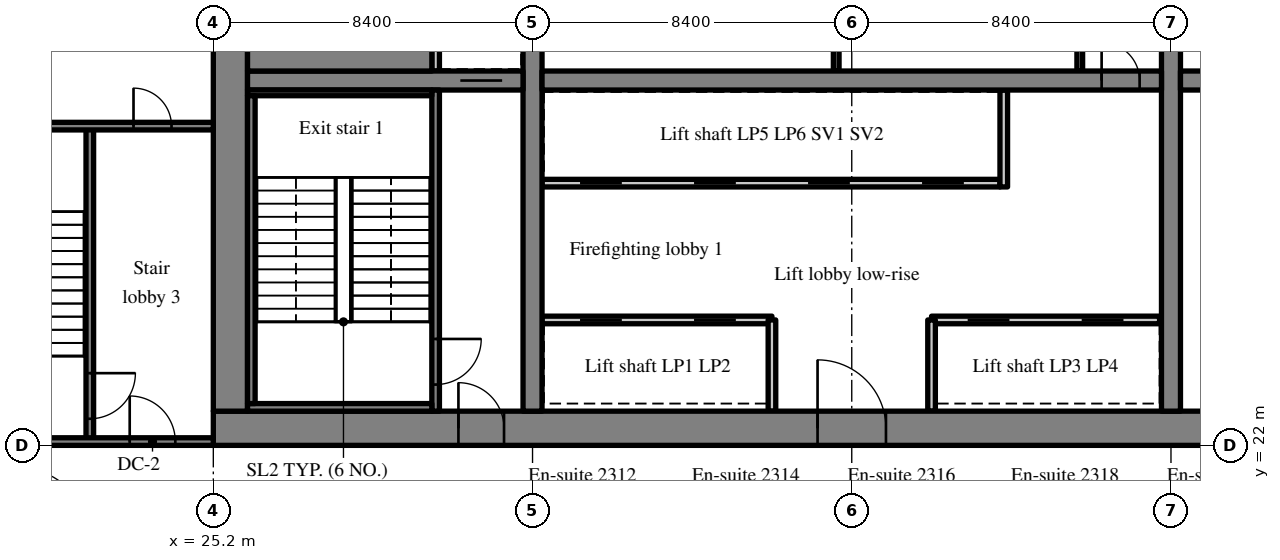
"""IFC4 building model, lengths in metres.
Left out: names, types, materials, properties, quantities, classifications, styles, units other than length and angle.
Written with IfcOpenShell. Run it as: python <this file> out.ifc"""

import sys

from ifc_helpers import new_model, si_unit, direction, frame, frame_2d, origin, place, context, subcontext, project, spatial, rectangle, extrude, source, transform, mapped, element, fill, save


model = new_model("IFC4")
c1 = context("Model", 3, precision=1e-05, world=origin(), true_north=direction((0.0, 1.0)))
c2 = subcontext(c1, "Body", "Model", "MODEL_VIEW")
j1 = project(units=[si_unit("LENGTHUNIT", "METRE"), si_unit("PLANEANGLEUNIT", "RADIAN")], contexts=[c1])
p1 = place(None, origin())
s1 = spatial("IfcSite", under=j1, at=p1, CompositionType="ELEMENT")
p2 = place(p1, origin())
s2 = spatial("IfcBuilding", under=s1, at=p2, CompositionType="ELEMENT")
p3 = place(p2, frame((0.0, 0.0, 99.0)))
s3 = spatial("IfcBuildingStorey", under=s2, at=p3, CompositionType="ELEMENT", Elevation=99.0)
m1 = source(origin(), c2, "Body", "SweptSolid", [
    extrude(rectangle(XDim=50.4, YDim=0.9, at=frame_2d((25.2, 0.0))), origin(), (0.0, 0.0, 1.0), 3.52),
])
p4 = place(p3, frame((25.2, 22.45, 0.0), z_axis=(0.0, 0.0, 1.0), x_axis=(1.0, 0.0, 0.0)))
e1 = element("IfcWall", 1, at=p4, inside=s3, PredefinedType="SHEAR", context=c2, shape_type="MappedRepresentation", body=[
    mapped(m1, transform((0.0, 0.0, 0.0), scale=1.0)),
])
m2 = source(origin(), c2, "Body", "SweptSolid", [
    extrude(rectangle(XDim=1.8, YDim=2.1, at=frame_2d((0.9, 1.05))), frame((0.0, 0.46, 0.0), z_axis=(0.0, -1.0, 0.0), x_axis=(1.0, 0.0, 0.0)), (0.0, 0.0, 1.0), 0.92),
])
p5 = place(p4, frame((15.9, 0.0, 0.0)))
e2 = element("IfcOpeningElement", 2, at=p5, cuts=e1, PredefinedType="OPENING", context=c2, shape_type="MappedRepresentation", body=[
    mapped(m2, transform((0.0, 0.0, 0.0), scale=1.0)),
])
m3 = source(origin(), c2, "Body", "SweptSolid", [
    extrude(rectangle(XDim=1.2, YDim=2.1, at=frame_2d((0.6, 1.05))), frame((0.0, 0.46, 0.0), z_axis=(0.0, -1.0, 0.0), x_axis=(1.0, 0.0, 0.0)), (0.0, 0.0, 1.0), 0.92),
])
p6 = place(p4, frame((26.975, 0.0, 0.0)))
e3 = element("IfcOpeningElement", 3, at=p6, cuts=e1, PredefinedType="OPENING", context=c2, shape_type="MappedRepresentation", body=[
    mapped(m3, transform((0.0, 0.0, 0.0), scale=1.0)),
])
m4 = source(origin(), c2, "Body", "SweptSolid", [
    extrude(rectangle(XDim=0.9, YDim=2.1, at=frame_2d((0.45, 1.05))), frame((0.0, 0.46, 0.0), z_axis=(0.0, -1.0, 0.0), x_axis=(1.0, 0.0, 0.0)), (0.0, 0.0, 1.0), 0.92),
])
p7 = place(p4, frame((32.25, 0.0, 0.0)))
e4 = element("IfcOpeningElement", 4, at=p7, cuts=e1, PredefinedType="OPENING", context=c2, shape_type="MappedRepresentation", body=[
    mapped(m4, transform((0.0, 0.0, 0.0), scale=1.0)),
])
p8 = place(p4, frame((38.275, 0.0, 0.0)))
e5 = element("IfcOpeningElement", 5, at=p8, cuts=e1, PredefinedType="OPENING", context=c2, shape_type="MappedRepresentation", body=[
    mapped(m4, transform((0.0, 0.0, 0.0), scale=1.0)),
])
p9 = place(p4, frame((6.45, 0.0, 0.0)))
e6 = element("IfcOpeningElement", 6, at=p9, cuts=e1, PredefinedType="OPENING", context=c2, shape_type="MappedRepresentation", body=[
    mapped(m3, transform((0.0, 0.0, 0.0), scale=1.0)),
])
p10 = place(p4, frame((47.775, 0.0, 0.0)))
e7 = element("IfcOpeningElement", 7, at=p10, cuts=e1, PredefinedType="OPENING", context=c2, shape_type="MappedRepresentation", body=[
    mapped(m3, transform((0.0, 0.0, 0.0), scale=1.0)),
])
m5 = source(origin(), c2, "Body", "SweptSolid", [
    extrude(rectangle(XDim=18.2, YDim=0.9, at=frame_2d((9.1, 0.0))), origin(), (0.0, 0.0, 1.0), 3.52),
])
p11 = place(p3, frame((25.65, 22.9, 0.0), z_axis=(0.0, 0.0, 1.0), x_axis=(0.0, 1.0, 0.0)))
e8 = element("IfcWall", 8, at=p11, inside=s3, PredefinedType="SHEAR", context=c2, shape_type="MappedRepresentation", body=[
    mapped(m5, transform((0.0, 0.0, 0.0), scale=1.0)),
])
m6 = source(origin(), c2, "Body", "SweptSolid", [
    extrude(rectangle(XDim=18.2, YDim=0.5, at=frame_2d((9.1, 0.0))), origin(), (0.0, 0.0, 1.0), 3.52),
])
p12 = place(p3, frame((33.6, 22.9, 0.0), z_axis=(0.0, 0.0, 1.0), x_axis=(0.0, 1.0, 0.0)))
e9 = element("IfcWall", 9, at=p12, inside=s3, PredefinedType="SHEAR", context=c2, shape_type="MappedRepresentation", body=[
    mapped(m6, transform((0.0, 0.0, 0.0), scale=1.0)),
])
m7 = source(origin(), c2, "Body", "SweptSolid", [
    extrude(rectangle(XDim=1.1, YDim=2.1, at=frame_2d((0.55, 1.05))), frame((0.0, 0.26, 0.0), z_axis=(0.0, -1.0, 0.0), x_axis=(1.0, 0.0, 0.0)), (0.0, 0.0, 1.0), 0.52),
])
p13 = place(p12, frame((12.55, 0.0, 0.0)))
e10 = element("IfcOpeningElement", 10, at=p13, cuts=e9, PredefinedType="OPENING", context=c2, shape_type="MappedRepresentation", body=[
    mapped(m7, transform((0.0, 0.0, 0.0), scale=1.0)),
])
p14 = place(p3, frame((50.4, 22.9, 0.0), z_axis=(0.0, 0.0, 1.0), x_axis=(0.0, 1.0, 0.0)))
e11 = element("IfcWall", 11, at=p14, inside=s3, PredefinedType="SHEAR", context=c2, shape_type="MappedRepresentation", body=[
    mapped(m6, transform((0.0, 0.0, 0.0), scale=1.0)),
])
p15 = place(p14, frame((12.55, 0.0, 0.0)))
e12 = element("IfcOpeningElement", 12, at=p15, cuts=e11, PredefinedType="OPENING", context=c2, shape_type="MappedRepresentation", body=[
    mapped(m7, transform((0.0, 0.0, 0.0), scale=1.0)),
])
m8 = source(origin(), c2, "Body", "SweptSolid", [
    extrude(rectangle(XDim=7.25, YDim=0.5, at=frame_2d((3.625, 0.0))), origin(), (0.0, 0.0, 1.0), 3.52),
])
p16 = place(p3, frame((26.1, 31.6, 0.0), z_axis=(0.0, 0.0, 1.0), x_axis=(1.0, 0.0, 0.0)))
e13 = element("IfcWall", 13, at=p16, inside=s3, PredefinedType="SHEAR", context=c2, shape_type="MappedRepresentation", body=[
    mapped(m8, transform((0.0, 0.0, 0.0), scale=1.0)),
])
p17 = place(p16, frame((5.6, 0.0, 0.0)))
e14 = element("IfcOpeningElement", 14, at=p17, cuts=e13, PredefinedType="OPENING", context=c2, shape_type="MappedRepresentation", body=[
    mapped(m7, transform((0.0, 0.0, 0.0), scale=1.0)),
])
m9 = source(origin(), c2, "Body", "SweptSolid", [
    extrude(rectangle(XDim=16.3, YDim=0.5, at=frame_2d((8.15, 0.0))), origin(), (0.0, 0.0, 1.0), 3.52),
])
p18 = place(p3, frame((33.85, 31.6, 0.0), z_axis=(0.0, 0.0, 1.0), x_axis=(1.0, 0.0, 0.0)))
e15 = element("IfcWall", 15, at=p18, inside=s3, PredefinedType="SHEAR", context=c2, shape_type="MappedRepresentation", body=[
    mapped(m9, transform((0.0, 0.0, 0.0), scale=1.0)),
])
m10 = source(origin(), c2, "Body", "SweptSolid", [
    extrude(rectangle(XDim=1.0, YDim=2.1, at=frame_2d((0.5, 1.05))), frame((0.0, 0.26, 0.0), z_axis=(0.0, -1.0, 0.0), x_axis=(1.0, 0.0, 0.0)), (0.0, 0.0, 1.0), 0.52),
])
p19 = place(p18, frame((14.725, 0.0, 0.0)))
e16 = element("IfcOpeningElement", 16, at=p19, cuts=e15, PredefinedType="OPENING", context=c2, shape_type="MappedRepresentation", body=[
    mapped(m10, transform((0.0, 0.0, 0.0), scale=1.0)),
])
m11 = source(origin(), c2, "Body", "SweptSolid", [
    extrude(rectangle(XDim=16.3, YDim=0.5, at=frame_2d((8.15, 0.0))), origin(), (0.0, 0.0, 1.0), 3.52),
])
p20 = place(p3, frame((50.65, 31.6, 0.0), z_axis=(0.0, 0.0, 1.0), x_axis=(1.0, 0.0, 0.0)))
e17 = element("IfcWall", 17, at=p20, inside=s3, PredefinedType="SHEAR", context=c2, shape_type="MappedRepresentation", body=[
    mapped(m11, transform((0.0, 0.0, 0.0), scale=1.0)),
])
p21 = place(p20, frame((0.575, 0.0, 0.0)))
e18 = element("IfcOpeningElement", 18, at=p21, cuts=e17, PredefinedType="OPENING", context=c2, shape_type="MappedRepresentation", body=[
    mapped(m10, transform((0.0, 0.0, 0.0), scale=1.0)),
])
m12 = source(origin(), c2, "Body", "SweptSolid", [
    extrude(rectangle(XDim=6.05, YDim=0.2, at=frame_2d((3.025, 0.0))), origin(), (0.0, 0.0, 1.0), 3.52),
])
p22 = place(p3, frame((33.85, 25.3, 0.0), z_axis=(0.0, 0.0, 1.0), x_axis=(1.0, 0.0, 0.0)))
e19 = element("IfcWall", 19, at=p22, inside=s3, PredefinedType="SOLIDWALL", context=c2, shape_type="MappedRepresentation", body=[
    mapped(m12, transform((0.0, 0.0, 0.0), scale=1.0)),
])
m13 = source(origin(), c2, "Body", "SweptSolid", [
    extrude(rectangle(XDim=1.1, YDim=2.1, at=frame_2d((0.55, 1.05))), frame((0.0, 0.11, 0.0), z_axis=(0.0, -1.0, 0.0), x_axis=(1.0, 0.0, 0.0)), (0.0, 0.0, 1.0), 0.22),
])
p23 = place(p22, frame((1.0, 0.0, 0.0)))
e20 = element("IfcOpeningElement", 20, at=p23, cuts=e19, PredefinedType="OPENING", context=c2, shape_type="MappedRepresentation", body=[
    mapped(m13, transform((0.0, 0.0, 0.0), scale=1.0)),
])
p24 = place(p22, frame((4.0, 0.0, 0.0)))
e21 = element("IfcOpeningElement", 21, at=p24, cuts=e19, PredefinedType="OPENING", context=c2, shape_type="MappedRepresentation", body=[
    mapped(m13, transform((0.0, 0.0, 0.0), scale=1.0)),
])
m14 = source(origin(), c2, "Body", "SweptSolid", [
    extrude(rectangle(XDim=6.0, YDim=0.2, at=frame_2d((3.0, 0.0))), origin(), (0.0, 0.0, 1.0), 3.52),
])
p25 = place(p3, frame((44.1, 25.3, 0.0), z_axis=(0.0, 0.0, 1.0), x_axis=(1.0, 0.0, 0.0)))
e22 = element("IfcWall", 22, at=p25, inside=s3, PredefinedType="SOLIDWALL", context=c2, shape_type="MappedRepresentation", body=[
    mapped(m14, transform((0.0, 0.0, 0.0), scale=1.0)),
])
p26 = place(p25, frame((0.95, 0.0, 0.0)))
e23 = element("IfcOpeningElement", 23, at=p26, cuts=e22, PredefinedType="OPENING", context=c2, shape_type="MappedRepresentation", body=[
    mapped(m13, transform((0.0, 0.0, 0.0), scale=1.0)),
])
p27 = place(p25, frame((3.95, 0.0, 0.0)))
e24 = element("IfcOpeningElement", 24, at=p27, cuts=e22, PredefinedType="OPENING", context=c2, shape_type="MappedRepresentation", body=[
    mapped(m13, transform((0.0, 0.0, 0.0), scale=1.0)),
])
m15 = source(origin(), c2, "Body", "SweptSolid", [
    extrude(rectangle(XDim=12.05, YDim=0.2, at=frame_2d((6.025, 0.0))), origin(), (0.0, 0.0, 1.0), 3.52),
])
p28 = place(p3, frame((33.85, 28.9, 0.0), z_axis=(0.0, 0.0, 1.0), x_axis=(1.0, 0.0, 0.0)))
e25 = element("IfcWall", 25, at=p28, inside=s3, PredefinedType="SOLIDWALL", context=c2, shape_type="MappedRepresentation", body=[
    mapped(m15, transform((0.0, 0.0, 0.0), scale=1.0)),
])
p29 = place(p28, frame((1.0, 0.0, 0.0)))
e26 = element("IfcOpeningElement", 26, at=p29, cuts=e25, PredefinedType="OPENING", context=c2, shape_type="MappedRepresentation", body=[
    mapped(m13, transform((0.0, 0.0, 0.0), scale=1.0)),
])
p30 = place(p28, frame((4.0, 0.0, 0.0)))
e27 = element("IfcOpeningElement", 27, at=p30, cuts=e25, PredefinedType="OPENING", context=c2, shape_type="MappedRepresentation", body=[
    mapped(m13, transform((0.0, 0.0, 0.0), scale=1.0)),
])
p31 = place(p28, frame((7.0, 0.0, 0.0)))
e28 = element("IfcOpeningElement", 28, at=p31, cuts=e25, PredefinedType="OPENING", context=c2, shape_type="MappedRepresentation", body=[
    mapped(m13, transform((0.0, 0.0, 0.0), scale=1.0)),
])
p32 = place(p28, frame((10.0, 0.0, 0.0)))
e29 = element("IfcOpeningElement", 29, at=p32, cuts=e25, PredefinedType="OPENING", context=c2, shape_type="MappedRepresentation", body=[
    mapped(m13, transform((0.0, 0.0, 0.0), scale=1.0)),
])
m16 = source(origin(), c2, "Body", "SweptSolid", [
    extrude(rectangle(XDim=2.4, YDim=0.2, at=frame_2d((1.2, 0.0))), origin(), (0.0, 0.0, 1.0), 3.52),
])
for number, where, z_axis, x_axis in (
    (30, (39.9, 22.9, 0.0), (0.0, 0.0, 1.0), (0.0, 1.0, 0.0)),
    (31, (44.1, 22.9, 0.0), (0.0, 0.0, 1.0), (0.0, 1.0, 0.0)),
):
    element("IfcWall", number, at=place(p3, frame(where, z_axis=z_axis, x_axis=x_axis)), inside=s3, PredefinedType="SOLIDWALL", context=c2, shape_type="MappedRepresentation", body=[
        mapped(m16, transform((0.0, 0.0, 0.0), scale=1.0)),
    ])
m17 = source(origin(), c2, "Body", "SweptSolid", [
    extrude(rectangle(XDim=2.55, YDim=0.2, at=frame_2d((1.275, 0.0))), origin(), (0.0, 0.0, 1.0), 3.52),
])
p33 = place(p3, frame((46.0, 28.8, 0.0), z_axis=(0.0, 0.0, 1.0), x_axis=(0.0, 1.0, 0.0)))
e32 = element("IfcWall", 32, at=p33, inside=s3, PredefinedType="SOLIDWALL", context=c2, shape_type="MappedRepresentation", body=[
    mapped(m17, transform((0.0, 0.0, 0.0), scale=1.0)),
])
m18 = source(origin(), c2, "Body", "SweptSolid", [
    extrude(rectangle(XDim=3.15, YDim=0.15, at=frame_2d((1.575, 0.0))), origin(), (0.0, 0.0, 1.0), 3.52),
])
for number, where, z_axis, x_axis in (
    (33, (48.0, 31.85, 0.0), (0.0, 0.0, 1.0), (0.0, 1.0, 0.0)),
    (34, (41.591, 31.85, 0.0), (0.0, 0.0, 1.0), (0.0, 1.0, 0.0)),
):
    element("IfcWall", number, at=place(p3, frame(where, z_axis=z_axis, x_axis=x_axis)), inside=s3, PredefinedType="PARTITIONING", context=c2, shape_type="MappedRepresentation", body=[
        mapped(m18, transform((0.0, 0.0, 0.0), scale=1.0)),
    ])
m19 = source(origin(), c2, "Body", "SweptSolid", [
    extrude(rectangle(XDim=8.45, YDim=0.2, at=frame_2d((4.225, 0.0))), origin(), (0.0, 0.0, 1.0), 3.52),
])
p34 = place(p3, frame((31.05, 22.9, 0.0), z_axis=(0.0, 0.0, 1.0), x_axis=(0.0, 1.0, 0.0)))
e35 = element("IfcWall", 35, at=p34, inside=s3, PredefinedType="SOLIDWALL", context=c2, shape_type="MappedRepresentation", body=[
    mapped(m19, transform((0.0, 0.0, 0.0), scale=1.0)),
])
m20 = source(origin(), c2, "Body", "SweptSolid", [
    extrude(rectangle(XDim=1.2, YDim=2.1, at=frame_2d((0.6, 1.05))), frame((0.0, 0.11, 0.0), z_axis=(0.0, -1.0, 0.0), x_axis=(1.0, 0.0, 0.0)), (0.0, 0.0, 1.0), 0.22),
])
p35 = place(p34, frame((0.7, 0.0, 0.0)))
e36 = element("IfcOpeningElement", 36, at=p35, cuts=e35, PredefinedType="OPENING", context=c2, shape_type="MappedRepresentation", body=[
    mapped(m20, transform((0.0, 0.0, 0.0), scale=1.0)),
])
m21 = source(origin(), c2, "Body", "SweptSolid", [
    extrude(rectangle(XDim=1.75, YDim=0.2, at=frame_2d((0.875, 0.0))), origin(), (0.0, 0.0, 1.0), 3.52),
])
p36 = place(p3, frame((31.05, 31.85, 0.0), z_axis=(0.0, 0.0, 1.0), x_axis=(0.0, 1.0, 0.0)))
e37 = element("IfcWall", 37, at=p36, inside=s3, PredefinedType="SOLIDWALL", context=c2, shape_type="MappedRepresentation", body=[
    mapped(m21, transform((0.0, 0.0, 0.0), scale=1.0)),
])
m22 = source(origin(), c2, "Body", "SweptSolid", [
    extrude(rectangle(XDim=8.3, YDim=0.2, at=frame_2d((4.15, 0.0))), origin(), (0.0, 0.0, 1.0), 3.52),
])
p37 = place(p3, frame((21.95, 22.1, 0.0), z_axis=(0.0, 0.0, 1.0), x_axis=(0.0, 1.0, 0.0)))
e38 = element("IfcWall", 38, at=p37, inside=s3, PredefinedType="SOLIDWALL", context=c2, shape_type="MappedRepresentation", body=[
    mapped(m22, transform((0.0, 0.0, 0.0), scale=1.0)),
])
p38 = place(p37, frame((0.6, 0.0, 0.0)))
e39 = element("IfcOpeningElement", 39, at=p38, cuts=e38, PredefinedType="OPENING", context=c2, shape_type="MappedRepresentation", body=[
    mapped(m20, transform((0.0, 0.0, 0.0), scale=1.0)),
])
m23 = source(origin(), c2, "Body", "SweptSolid", [
    extrude(rectangle(XDim=8.225, YDim=0.2, at=frame_2d((4.112, 0.0))), origin(), (0.0, 0.0, 1.0), 3.52),
])
p39 = place(p3, frame((16.975, 22.1, 0.0), z_axis=(0.0, 0.0, 1.0), x_axis=(1.0, 0.0, 0.0)))
e40 = element("IfcWall", 40, at=p39, inside=s3, PredefinedType="SOLIDWALL", context=c2, shape_type="MappedRepresentation", body=[
    mapped(m23, transform((0.0, 0.0, 0.0), scale=1.0)),
])
p40 = place(p39, frame((6.025, 0.0, 0.0)))
e41 = element("IfcOpeningElement", 41, at=p40, cuts=e40, PredefinedType="OPENING", context=c2, shape_type="MappedRepresentation", body=[
    mapped(m20, transform((0.0, 0.0, 0.0), scale=1.0)),
])
p41 = place(p3, frame((16.975, 30.4, 0.0), z_axis=(0.0, 0.0, 1.0), x_axis=(1.0, 0.0, 0.0)))
e42 = element("IfcWall", 42, at=p41, inside=s3, PredefinedType="SOLIDWALL", context=c2, shape_type="MappedRepresentation", body=[
    mapped(m23, transform((0.0, 0.0, 0.0), scale=1.0)),
])
m24 = source(origin(), c2, "Body", "SweptSolid", [
    extrude(rectangle(XDim=1.0, YDim=2.1, at=frame_2d((0.5, 1.05))), frame((0.0, 0.11, 0.0), z_axis=(0.0, -1.0, 0.0), x_axis=(1.0, 0.0, 0.0)), (0.0, 0.0, 1.0), 0.22),
])
p42 = place(p41, frame((6.125, 0.0, 0.0)))
e43 = element("IfcOpeningElement", 43, at=p42, cuts=e42, PredefinedType="OPENING", context=c2, shape_type="MappedRepresentation", body=[
    mapped(m24, transform((0.0, 0.0, 0.0), scale=1.0)),
])
m25 = source(origin(), c2, "Body", "SweptSolid", [
    extrude(rectangle(XDim=4.85, YDim=0.2, at=frame_2d((2.425, 0.0))), origin(), (0.0, 0.0, 1.0), 3.52),
])
p43 = place(p3, frame((26.1, 23.0, 0.0), z_axis=(0.0, 0.0, 1.0), x_axis=(1.0, 0.0, 0.0)))
e44 = element("IfcWall", 44, at=p43, inside=s3, PredefinedType="SOLIDWALL", context=c2, shape_type="MappedRepresentation", body=[
    mapped(m25, transform((0.0, 0.0, 0.0), scale=1.0)),
])
m26 = source(origin(), c2, "Body", "SweptSolid", [
    extrude(rectangle(XDim=4.85, YDim=0.15, at=frame_2d((2.425, 0.0))), origin(), (0.0, 0.0, 1.0), 3.52),
])
p44 = place(p3, frame((26.1, 31.275, 0.0), z_axis=(0.0, 0.0, 1.0), x_axis=(1.0, 0.0, 0.0)))
e45 = element("IfcWall", 45, at=p44, inside=s3, PredefinedType="SOLIDWALL", context=c2, shape_type="MappedRepresentation", body=[
    mapped(m26, transform((0.0, 0.0, 0.0), scale=1.0)),
])
m27 = source(origin(), c2, "Body", "SweptSolid", [
    extrude(rectangle(XDim=8.1, YDim=0.2, at=frame_2d((4.05, 0.0))), origin(), (0.0, 0.0, 1.0), 3.52),
])
p45 = place(p3, frame((26.2, 23.1, 0.0), z_axis=(0.0, 0.0, 1.0), x_axis=(0.0, 1.0, 0.0)))
e46 = element("IfcWall", 46, at=p45, inside=s3, PredefinedType="SOLIDWALL", context=c2, shape_type="MappedRepresentation", body=[
    mapped(m27, transform((0.0, 0.0, 0.0), scale=1.0)),
])
m28 = source(origin(), c2, "Body", "SweptSolid", [
    extrude(rectangle(XDim=4.85, YDim=0.95, at=frame_2d((2.425, 0.0))), origin(), (0.0, 0.0, 1.0), 3.52),
])
p46 = place(p3, frame((26.1, 32.325, 0.0), z_axis=(0.0, 0.0, 1.0), x_axis=(1.0, 0.0, 0.0)))
e47 = element("IfcWall", 47, at=p46, inside=s3, PredefinedType="SOLIDWALL", context=c2, shape_type="MappedRepresentation", body=[
    mapped(m28, transform((0.0, 0.0, 0.0), scale=1.0)),
])
m29 = source(origin(), c2, "Body", "SweptSolid", [
    extrude(rectangle(XDim=1.8, YDim=2.1, at=frame_2d((0.9, 1.05))), frame((0.0, 0.375, 0.0), z_axis=(0.0, -1.0, 0.0), x_axis=(1.0, 0.0, 0.0)), (0.0, 0.0, 1.0), 0.05),
])
p47 = place(p5, origin())
e48 = element("IfcDoor", 48, at=p47, inside=s3, OperationType="DOUBLE_DOOR_SINGLE_SWING", PredefinedType="DOOR", context=c2, shape_type="MappedRepresentation", body=[
    mapped(m29, transform((0.0, 0.0, 0.0), scale=1.0)),
])
fill(e2, e48)
m30 = source(origin(), c2, "Body", "SweptSolid", [
    extrude(rectangle(XDim=1.0, YDim=2.1, at=frame_2d((0.5, 1.05))), frame((0.0, 0.025, 0.0), z_axis=(0.0, -1.0, 0.0), x_axis=(1.0, 0.0, 0.0)), (0.0, 0.0, 1.0), 0.05),
])
p48 = place(p19, origin())
e49 = element("IfcDoor", 49, at=p48, inside=s3, OperationType="SINGLE_SWING_LEFT", PredefinedType="DOOR", context=c2, shape_type="MappedRepresentation", body=[
    mapped(m30, transform((0.0, 0.0, 0.0), scale=1.0)),
])
fill(e16, e49)
m31 = source(origin(), c2, "Body", "SweptSolid", [
    extrude(rectangle(XDim=1.1, YDim=2.1, at=frame_2d((0.55, 1.05))), frame((0.0, 0.025, 0.0), z_axis=(0.0, -1.0, 0.0), x_axis=(1.0, 0.0, 0.0)), (0.0, 0.0, 1.0), 0.05),
])
p49 = place(p23, origin())
e50 = element("IfcDoor", 50, at=p49, inside=s3, OperationType="SLIDING_TO_LEFT", PredefinedType="DOOR", context=c2, shape_type="MappedRepresentation", body=[
    mapped(m31, transform((0.0, 0.0, 0.0), scale=1.0)),
])
fill(e20, e50)
p50 = place(p24, origin())
e51 = element("IfcDoor", 51, at=p50, inside=s3, OperationType="SLIDING_TO_RIGHT", PredefinedType="DOOR", context=c2, shape_type="MappedRepresentation", body=[
    mapped(m31, transform((0.0, 0.0, 0.0), scale=1.0)),
])
fill(e21, e51)
p51 = place(p26, origin())
e52 = element("IfcDoor", 52, at=p51, inside=s3, OperationType="SLIDING_TO_LEFT", PredefinedType="DOOR", context=c2, shape_type="MappedRepresentation", body=[
    mapped(m31, transform((0.0, 0.0, 0.0), scale=1.0)),
])
fill(e23, e52)
p52 = place(p27, origin())
e53 = element("IfcDoor", 53, at=p52, inside=s3, OperationType="SLIDING_TO_RIGHT", PredefinedType="DOOR", context=c2, shape_type="MappedRepresentation", body=[
    mapped(m31, transform((0.0, 0.0, 0.0), scale=1.0)),
])
fill(e24, e53)
p53 = place(p29, origin())
e54 = element("IfcDoor", 54, at=p53, inside=s3, OperationType="SLIDING_TO_LEFT", PredefinedType="DOOR", context=c2, shape_type="MappedRepresentation", body=[
    mapped(m31, transform((0.0, 0.0, 0.0), scale=1.0)),
])
fill(e26, e54)
p54 = place(p30, origin())
e55 = element("IfcDoor", 55, at=p54, inside=s3, OperationType="SLIDING_TO_RIGHT", PredefinedType="DOOR", context=c2, shape_type="MappedRepresentation", body=[
    mapped(m31, transform((0.0, 0.0, 0.0), scale=1.0)),
])
fill(e27, e55)
p55 = place(p31, origin())
e56 = element("IfcDoor", 56, at=p55, inside=s3, OperationType="SLIDING_TO_LEFT", PredefinedType="DOOR", context=c2, shape_type="MappedRepresentation", body=[
    mapped(m31, transform((0.0, 0.0, 0.0), scale=1.0)),
])
fill(e28, e56)
p56 = place(p32, origin())
e57 = element("IfcDoor", 57, at=p56, inside=s3, OperationType="SLIDING_TO_RIGHT", PredefinedType="DOOR", context=c2, shape_type="MappedRepresentation", body=[
    mapped(m31, transform((0.0, 0.0, 0.0), scale=1.0)),
])
fill(e29, e57)
m32 = source(origin(), c2, "Body", "SweptSolid", [
    extrude(rectangle(XDim=1.2, YDim=2.1, at=frame_2d((0.6, 1.05))), frame((0.0, 0.025, 0.0), z_axis=(0.0, -1.0, 0.0), x_axis=(1.0, 0.0, 0.0)), (0.0, 0.0, 1.0), 0.05),
])
p57 = place(p35, origin())
e58 = element("IfcDoor", 58, at=p57, inside=s3, OperationType="SINGLE_SWING_RIGHT", PredefinedType="DOOR", context=c2, shape_type="MappedRepresentation", body=[
    mapped(m32, transform((0.0, 0.0, 0.0), scale=1.0)),
])
fill(e36, e58)
m33 = source(origin(), c2, "Body", "SweptSolid", [
    extrude(rectangle(XDim=1.2, YDim=2.1, at=frame_2d((0.6, 1.05))), frame((0.0, 0.375, 0.0), z_axis=(0.0, -1.0, 0.0), x_axis=(1.0, 0.0, 0.0)), (0.0, 0.0, 1.0), 0.05),
])
p58 = place(p9, origin())
e59 = element("IfcDoor", 59, at=p58, inside=s3, OperationType="SINGLE_SWING_LEFT", PredefinedType="DOOR", context=c2, shape_type="MappedRepresentation", body=[
    mapped(m33, transform((0.0, 0.0, 0.0), scale=1.0)),
])
fill(e6, e59)
p59 = place(p17, origin())
e60 = element("IfcDoor", 60, at=p59, inside=s3, OperationType="SLIDING_TO_RIGHT", PredefinedType="DOOR", context=c2, shape_type="MappedRepresentation", body=[
    mapped(m31, transform((0.0, 0.0, 0.0), scale=1.0)),
])
fill(e14, e60)
p60 = place(p38, origin())
e61 = element("IfcDoor", 61, at=p60, inside=s3, OperationType="SINGLE_SWING_RIGHT", PredefinedType="DOOR", context=c2, shape_type="MappedRepresentation", body=[
    mapped(m32, transform((0.0, 0.0, 0.0), scale=1.0)),
])
fill(e39, e61)
p61 = place(p40, origin())
e62 = element("IfcDoor", 62, at=p61, inside=s3, OperationType="SINGLE_SWING_LEFT", PredefinedType="DOOR", context=c2, shape_type="MappedRepresentation", body=[
    mapped(m32, transform((0.0, 0.0, 0.0), scale=1.0)),
])
fill(e41, e62)
p62 = place(p42, origin())
e63 = element("IfcDoor", 63, at=p62, inside=s3, OperationType="SINGLE_SWING_LEFT", PredefinedType="DOOR", context=c2, shape_type="MappedRepresentation", body=[
    mapped(m30, transform((0.0, 0.0, 0.0), scale=1.0)),
])
fill(e43, e63)
save(model, sys.argv[1])
